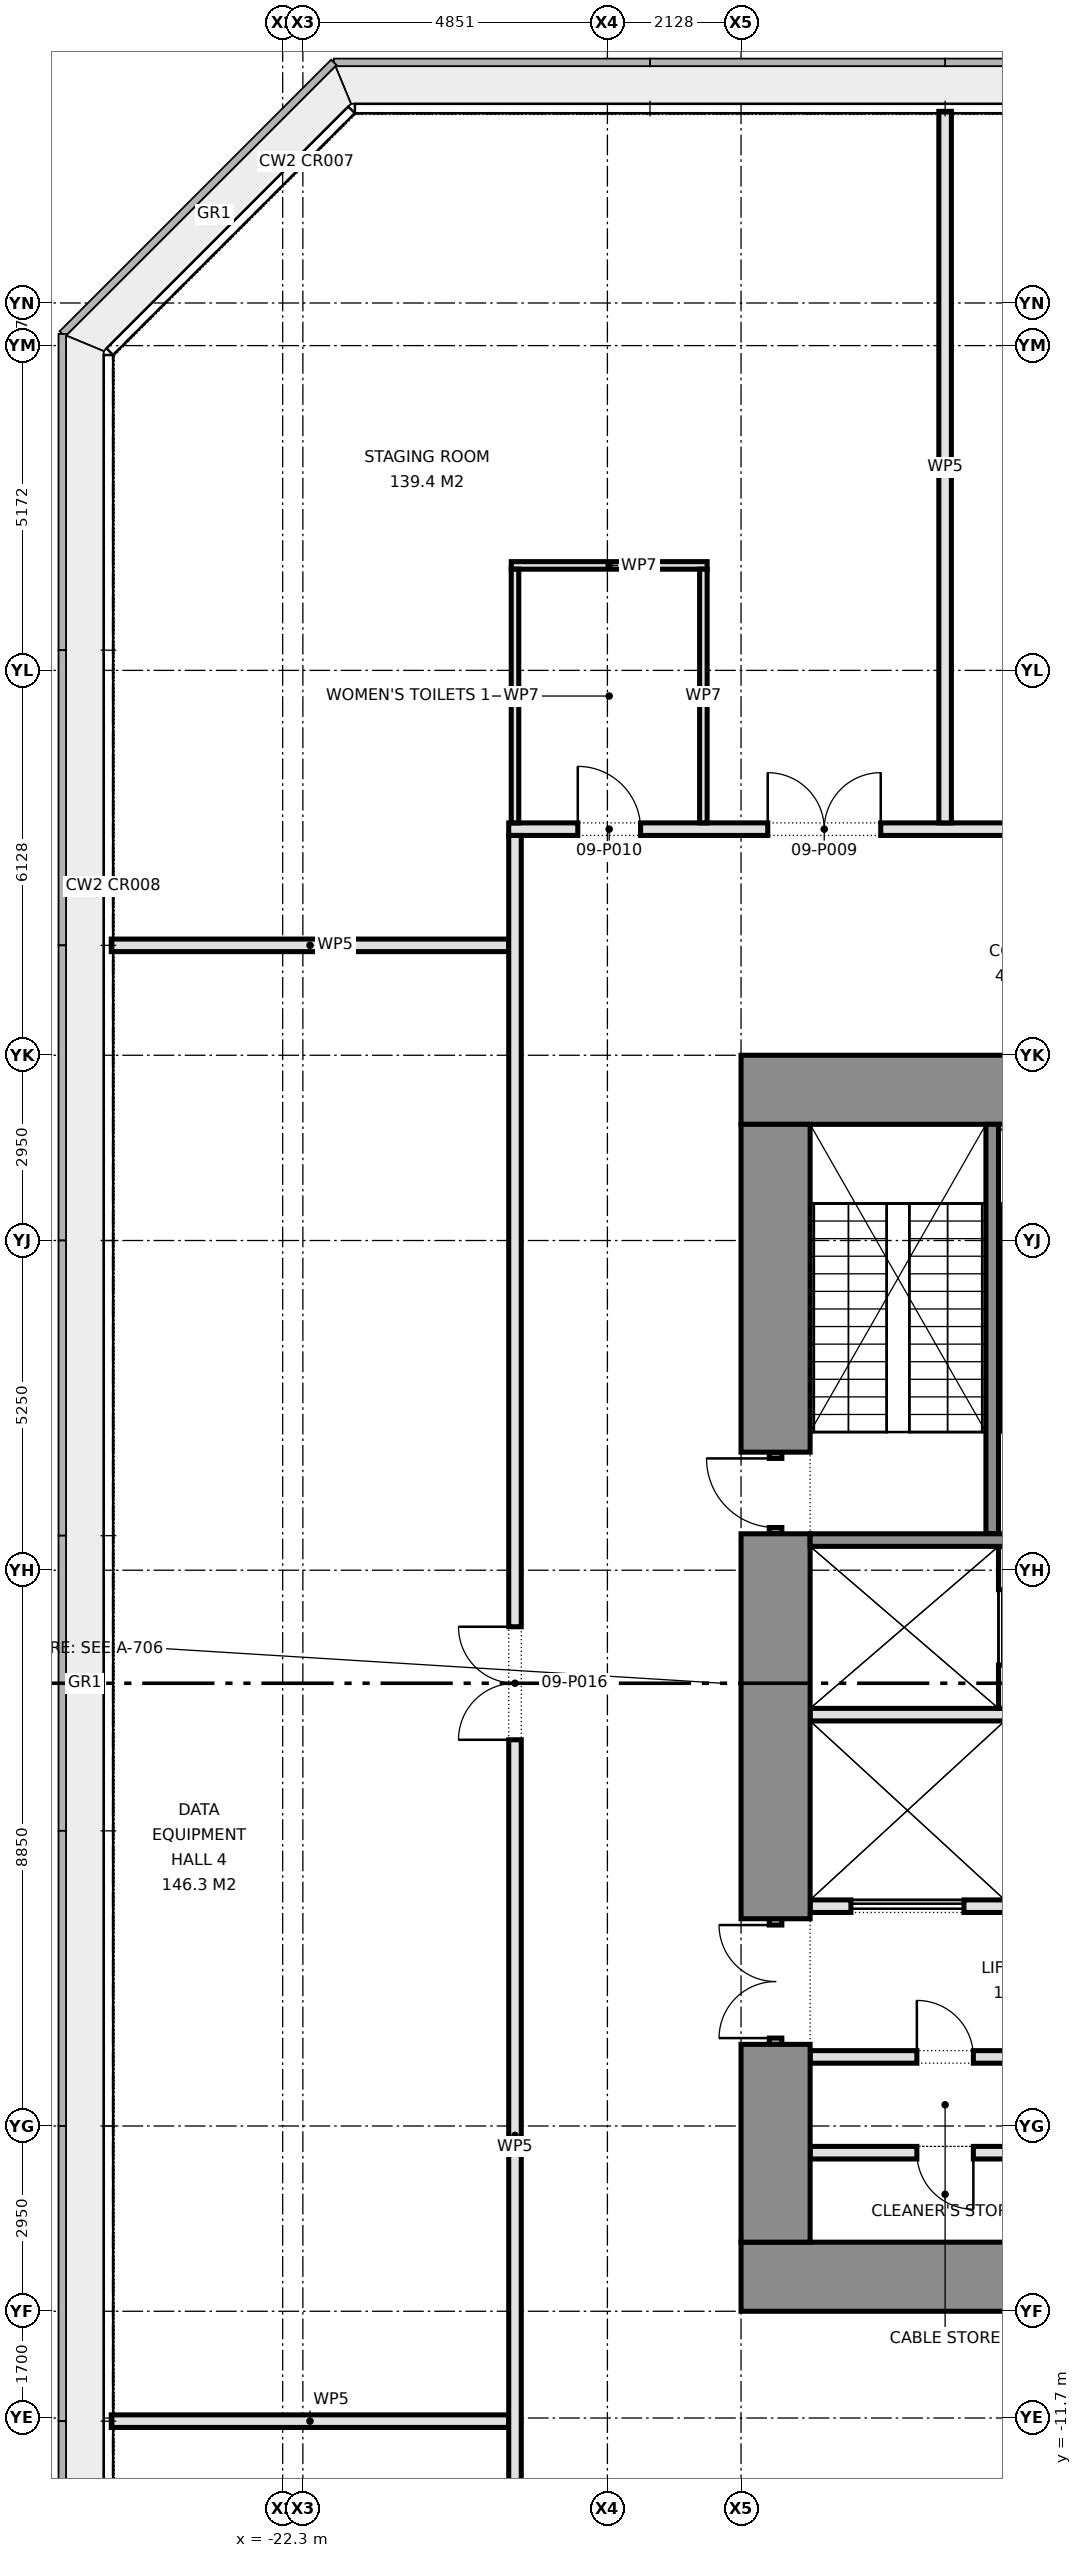
"""IFC4 building model, lengths in metres.
Left out: names, types, materials, properties, quantities, classifications, styles, units other than length and angle.
Written with IfcOpenShell. Run it as: python <this file> out.ifc"""

import sys

from ifc_helpers import new_model, si_unit, direction, frame, frame_2d, origin, place, context, subcontext, project, spatial, rectangle, extrude, element, fill, save


model = new_model("IFC4")
c1 = context("Model", 3, precision=1e-05, world=origin(), true_north=direction((0.0, 1.0)))
c2 = subcontext(c1, "Body", "Model", "MODEL_VIEW")
j1 = project(units=[si_unit("LENGTHUNIT", "METRE"), si_unit("PLANEANGLEUNIT", "RADIAN")], contexts=[c1])
p1 = place(None, origin())
s1 = spatial("IfcSite", under=j1, at=p1, CompositionType="ELEMENT")
p2 = place(p1, origin())
s2 = spatial("IfcBuilding", under=s1, at=p2, CompositionType="ELEMENT")
p3 = place(p2, frame((0.0, 0.0, 40.1)))
s3 = spatial("IfcBuildingStorey", under=s2, at=p3, CompositionType="ELEMENT", Elevation=40.1)
for number, where, z_axis, x_axis in (
    (1, (-15.0, -9.45, 0.0), (0.0, 0.0, 1.0), (1.0, 0.0, 0.0)),
    (2, (-15.0, 9.45, 0.0), (0.0, 0.0, 1.0), (1.0, 0.0, 0.0)),
):
    element("IfcWall", number, at=place(p3, frame(where, z_axis=z_axis, x_axis=x_axis)), inside=s3, PredefinedType="SHEAR", context=c2, shape_type="SweptSolid", body=[
        extrude(rectangle(XDim=11.0, YDim=1.1, at=frame_2d((5.5, 0.0))), origin(), (0.0, 0.0, 1.0), 4.575),
    ])
p4 = place(p3, frame((-14.45, -8.9, 0.0), z_axis=(0.0, 0.0, 1.0), x_axis=(0.0, 1.0, 0.0)))
e3 = element("IfcWall", 3, at=p4, inside=s3, PredefinedType="SHEAR", context=c2, shape_type="SweptSolid", body=[
    extrude(rectangle(XDim=3.15, YDim=1.1, at=frame_2d((1.575, 0.0))), origin(), (0.0, 0.0, 1.0), 4.575),
])
p5 = place(p3, frame((-14.45, -5.75, 0.0), z_axis=(0.0, 0.0, 1.0), x_axis=(0.0, 1.0, 0.0)))
e4 = element("IfcWall", 4, at=p5, inside=s3, PredefinedType="PARTITIONING", context=c2, shape_type="SweptSolid", body=[
    extrude(rectangle(XDim=2.0, YDim=0.2, at=frame_2d((1.0, 0.0))), origin(), (0.0, 0.0, 1.0), 2.4),
])
p6 = place(p5, frame((0.1, 0.0, 0.0)))
e5 = element("IfcOpeningElement", 5, at=p6, cuts=e4, PredefinedType="OPENING", context=c2, shape_type="SweptSolid", body=[
    extrude(rectangle(XDim=1.8, YDim=2.1, at=frame_2d((0.9, 1.05))), frame((0.0, 0.11, 0.0), z_axis=(0.0, -1.0, 0.0), x_axis=(1.0, 0.0, 0.0)), (0.0, 0.0, 1.0), 0.22),
])
p7 = place(p3, frame((-14.45, -3.75, 0.0), z_axis=(0.0, 0.0, 1.0), x_axis=(0.0, 1.0, 0.0)))
e6 = element("IfcWall", 6, at=p7, inside=s3, PredefinedType="SHEAR", context=c2, shape_type="SweptSolid", body=[
    extrude(rectangle(XDim=6.13, YDim=1.1, at=frame_2d((3.065, 0.0))), origin(), (0.0, 0.0, 1.0), 4.575),
])
p8 = place(p3, frame((-14.45, 2.38, 0.0), z_axis=(0.0, 0.0, 1.0), x_axis=(0.0, 1.0, 0.0)))
e7 = element("IfcWall", 7, at=p8, inside=s3, PredefinedType="SHEAR", context=c2, shape_type="SweptSolid", body=[
    extrude(rectangle(XDim=1.3, YDim=0.2, at=frame_2d((0.65, 0.0))), origin(), (0.0, 0.0, 1.0), 2.4),
])
p9 = place(p8, frame((0.1, 0.0, 0.0)))
e8 = element("IfcOpeningElement", 8, at=p9, cuts=e7, PredefinedType="OPENING", context=c2, shape_type="SweptSolid", body=[
    extrude(rectangle(XDim=1.1, YDim=2.1, at=frame_2d((0.55, 1.05))), frame((0.0, 0.11, 0.0), z_axis=(0.0, -1.0, 0.0), x_axis=(1.0, 0.0, 0.0)), (0.0, 0.0, 1.0), 0.22),
])
p10 = place(p3, frame((-14.45, 3.68, 0.0), z_axis=(0.0, 0.0, 1.0), x_axis=(0.0, 1.0, 0.0)))
e9 = element("IfcWall", 9, at=p10, inside=s3, PredefinedType="SHEAR", context=c2, shape_type="SweptSolid", body=[
    extrude(rectangle(XDim=5.22, YDim=1.1, at=frame_2d((2.61, 0.0))), origin(), (0.0, 0.0, 1.0), 4.575),
])
p11 = place(p3, frame((-13.9, -5.95, 0.0), z_axis=(0.0, 0.0, 1.0), x_axis=(1.0, 0.0, 0.0)))
e10 = element("IfcWall", 10, at=p11, inside=s3, PredefinedType="PARTITIONING", context=c2, shape_type="SweptSolid", body=[
    extrude(rectangle(XDim=8.8, YDim=0.2, at=frame_2d((4.4, 0.0))), origin(), (0.0, 0.0, 1.0), 4.575),
])
p12 = place(p11, frame((1.7, 0.0, 0.0)))
e11 = element("IfcOpeningElement", 11, at=p12, cuts=e10, PredefinedType="OPENING", context=c2, shape_type="SweptSolid", body=[
    extrude(rectangle(XDim=0.9, YDim=2.1, at=frame_2d((0.45, 1.05))), frame((0.0, 0.11, 0.0), z_axis=(0.0, -1.0, 0.0), x_axis=(1.0, 0.0, 0.0)), (0.0, 0.0, 1.0), 0.22),
])
p13 = place(p3, frame((-13.9, -3.55, 0.0), z_axis=(0.0, 0.0, 1.0), x_axis=(1.0, 0.0, 0.0)))
e12 = element("IfcWall", 12, at=p13, inside=s3, PredefinedType="PARTITIONING", context=c2, shape_type="SweptSolid", body=[
    extrude(rectangle(XDim=8.8, YDim=0.2, at=frame_2d((4.4, 0.0))), origin(), (0.0, 0.0, 1.0), 4.575),
])
p14 = place(p13, frame((0.65, 0.0, 0.0)))
e13 = element("IfcOpeningElement", 13, at=p14, cuts=e12, PredefinedType="OPENING", context=c2, shape_type="SweptSolid", body=[
    extrude(rectangle(XDim=1.8, YDim=2.1, at=frame_2d((0.9, 1.05))), frame((0.0, 0.11, 0.0), z_axis=(0.0, -1.0, 0.0), x_axis=(1.0, 0.0, 0.0)), (0.0, 0.0, 1.0), 0.22),
])
p15 = place(p13, frame((4.0, 0.0, 0.0)))
e14 = element("IfcOpeningElement", 14, at=p15, cuts=e12, PredefinedType="OPENING", context=c2, shape_type="SweptSolid", body=[
    extrude(rectangle(XDim=1.2, YDim=2.1, at=frame_2d((0.6, 1.05))), frame((0.0, 0.11, 0.0), z_axis=(0.0, -1.0, 0.0), x_axis=(1.0, 0.0, 0.0)), (0.0, 0.0, 1.0), 0.22),
])
p16 = place(p13, frame((6.85, 0.0, 0.0)))
e15 = element("IfcOpeningElement", 15, at=p16, cuts=e12, PredefinedType="OPENING", context=c2, shape_type="SweptSolid", body=[
    extrude(rectangle(XDim=1.2, YDim=2.1, at=frame_2d((0.6, 1.05))), frame((0.0, 0.11, 0.0), z_axis=(0.0, -1.0, 0.0), x_axis=(1.0, 0.0, 0.0)), (0.0, 0.0, 1.0), 0.22),
])
p17 = place(p3, frame((-13.9, -0.5, 0.0), z_axis=(0.0, 0.0, 1.0), x_axis=(1.0, 0.0, 0.0)))
e16 = element("IfcWall", 16, at=p17, inside=s3, PredefinedType="PARTITIONING", context=c2, shape_type="SweptSolid", body=[
    extrude(rectangle(XDim=8.8, YDim=0.2, at=frame_2d((4.4, 0.0))), origin(), (0.0, 0.0, 1.0), 4.575),
])
p18 = place(p3, frame((-10.8, -0.4, 0.0), z_axis=(0.0, 0.0, 1.0), x_axis=(0.0, 1.0, 0.0)))
e17 = element("IfcWall", 17, at=p18, inside=s3, PredefinedType="PARTITIONING", context=c2, shape_type="SweptSolid", body=[
    extrude(rectangle(XDim=2.58, YDim=0.2, at=frame_2d((1.29, 0.0))), origin(), (0.0, 0.0, 1.0), 4.575),
])
p19 = place(p18, frame((0.69, 0.0, 0.0)))
e18 = element("IfcOpeningElement", 18, at=p19, cuts=e17, PredefinedType="OPENING", context=c2, shape_type="SweptSolid", body=[
    extrude(rectangle(XDim=1.2, YDim=2.1, at=frame_2d((0.6, 1.05))), frame((0.0, 0.11, 0.0), z_axis=(0.0, -1.0, 0.0), x_axis=(1.0, 0.0, 0.0)), (0.0, 0.0, 1.0), 0.22),
])
p20 = place(p3, frame((-13.9, 2.28, 0.0), z_axis=(0.0, 0.0, 1.0), x_axis=(1.0, 0.0, 0.0)))
e19 = element("IfcWall", 19, at=p20, inside=s3, PredefinedType="SHEAR", context=c2, shape_type="SweptSolid", body=[
    extrude(rectangle(XDim=8.8, YDim=0.2, at=frame_2d((4.4, 0.0))), origin(), (0.0, 0.0, 1.0), 4.575),
])
p21 = place(p20, frame((3.8, 0.0, 0.0)))
e20 = element("IfcOpeningElement", 20, at=p21, cuts=e19, PredefinedType="OPENING", context=c2, shape_type="SweptSolid", body=[
    extrude(rectangle(XDim=1.2, YDim=2.1, at=frame_2d((0.6, 1.05))), frame((0.0, 0.11, 0.0), z_axis=(0.0, -1.0, 0.0), x_axis=(1.0, 0.0, 0.0)), (0.0, 0.0, 1.0), 0.22),
])
p22 = place(p20, frame((6.8, 0.0, 0.0)))
e21 = element("IfcOpeningElement", 21, at=p22, cuts=e19, PredefinedType="OPENING", context=c2, shape_type="SweptSolid", body=[
    extrude(rectangle(XDim=1.2, YDim=2.1, at=frame_2d((0.6, 1.05))), frame((0.0, 0.11, 0.0), z_axis=(0.0, -1.0, 0.0), x_axis=(1.0, 0.0, 0.0)), (0.0, 0.0, 1.0), 0.22),
])
p23 = place(p3, frame((-11.0, 2.38, 0.0), z_axis=(0.0, 0.0, 1.0), x_axis=(0.0, 1.0, 0.0)))
e22 = element("IfcWall", 22, at=p23, inside=s3, PredefinedType="SHEAR", context=c2, shape_type="SweptSolid", body=[
    extrude(rectangle(XDim=6.52, YDim=0.2, at=frame_2d((3.26, 0.0))), origin(), (0.0, 0.0, 1.0), 4.575),
])
p24 = place(p3, frame((-13.9, -7.475, 0.0), z_axis=(0.0, 0.0, 1.0), x_axis=(1.0, 0.0, 0.0)))
e23 = element("IfcWall", 23, at=p24, inside=s3, PredefinedType="PARTITIONING", context=c2, shape_type="SweptSolid", body=[
    extrude(rectangle(XDim=4.3, YDim=0.2, at=frame_2d((2.15, 0.0))), origin(), (0.0, 0.0, 1.0), 4.575),
])
p25 = place(p24, frame((1.7, 0.0, 0.0)))
e24 = element("IfcOpeningElement", 24, at=p25, cuts=e23, PredefinedType="OPENING", context=c2, shape_type="SweptSolid", body=[
    extrude(rectangle(XDim=0.9, YDim=2.1, at=frame_2d((0.45, 1.05))), frame((0.0, 0.11, 0.0), z_axis=(0.0, -1.0, 0.0), x_axis=(1.0, 0.0, 0.0)), (0.0, 0.0, 1.0), 0.22),
])
for number, where, z_axis, x_axis in (
    (25, (-25.03, -11.75, 0.0), (0.0, 0.0, 1.0), (1.0, 0.0, 0.0)),
    (26, (-25.03, 11.75, 0.0), (0.0, 0.0, 1.0), (1.0, 0.0, 0.0)),
):
    element("IfcWall", number, at=place(p3, frame(where, z_axis=z_axis, x_axis=x_axis)), inside=s3, PredefinedType="PARTITIONING", context=c2, shape_type="SweptSolid", body=[
        extrude(rectangle(XDim=6.33, YDim=0.2, at=frame_2d((3.165, 0.0))), origin(), (0.0, 0.0, 1.0), 4.575),
    ])
p26 = place(p3, frame((-18.7, 13.6, 0.0), z_axis=(0.0, 0.0, 1.0), x_axis=(1.0, 0.0, 0.0)))
e27 = element("IfcWall", 27, at=p26, inside=s3, PredefinedType="PARTITIONING", context=c2, shape_type="SweptSolid", body=[
    extrude(rectangle(XDim=37.4, YDim=0.2, at=frame_2d((18.7, 0.0))), origin(), (0.0, 0.0, 1.0), 4.575),
])
p27 = place(p26, frame((4.125, 0.0, 0.0)))
e28 = element("IfcOpeningElement", 28, at=p27, cuts=e27, PredefinedType="OPENING", context=c2, shape_type="SweptSolid", body=[
    extrude(rectangle(XDim=1.8, YDim=2.1, at=frame_2d((0.9, 1.05))), frame((0.0, 0.11, 0.0), z_axis=(0.0, -1.0, 0.0), x_axis=(1.0, 0.0, 0.0)), (0.0, 0.0, 1.0), 0.22),
])
p28 = place(p26, frame((1.1, 0.0, 0.0)))
e29 = element("IfcOpeningElement", 29, at=p28, cuts=e27, PredefinedType="OPENING", context=c2, shape_type="SweptSolid", body=[
    extrude(rectangle(XDim=1.0, YDim=2.1, at=frame_2d((0.5, 1.05))), frame((0.0, 0.11, 0.0), z_axis=(0.0, -1.0, 0.0), x_axis=(1.0, 0.0, 0.0)), (0.0, 0.0, 1.0), 0.22),
])
p29 = place(p26, frame((10.75, 0.0, 0.0)))
e30 = element("IfcOpeningElement", 30, at=p29, cuts=e27, PredefinedType="OPENING", context=c2, shape_type="SweptSolid", body=[
    extrude(rectangle(XDim=1.8, YDim=2.1, at=frame_2d((0.9, 1.05))), frame((0.0, 0.11, 0.0), z_axis=(0.0, -1.0, 0.0), x_axis=(1.0, 0.0, 0.0)), (0.0, 0.0, 1.0), 0.22),
])
p30 = place(p26, frame((20.15, 0.0, 0.0)))
e31 = element("IfcOpeningElement", 31, at=p30, cuts=e27, PredefinedType="OPENING", context=c2, shape_type="SweptSolid", body=[
    extrude(rectangle(XDim=1.8, YDim=2.1, at=frame_2d((0.9, 1.05))), frame((0.0, 0.11, 0.0), z_axis=(0.0, -1.0, 0.0), x_axis=(1.0, 0.0, 0.0)), (0.0, 0.0, 1.0), 0.22),
])
p31 = place(p26, frame((30.625, 0.0, 0.0)))
e32 = element("IfcOpeningElement", 32, at=p31, cuts=e27, PredefinedType="OPENING", context=c2, shape_type="SweptSolid", body=[
    extrude(rectangle(XDim=1.8, YDim=2.1, at=frame_2d((0.9, 1.05))), frame((0.0, 0.11, 0.0), z_axis=(0.0, -1.0, 0.0), x_axis=(1.0, 0.0, 0.0)), (0.0, 0.0, 1.0), 0.22),
])
p32 = place(p3, frame((-11.75, 13.7, 0.0), z_axis=(0.0, 0.0, 1.0), x_axis=(0.0, 1.0, 0.0)))
e33 = element("IfcWall", 33, at=p32, inside=s3, PredefinedType="PARTITIONING", context=c2, shape_type="SweptSolid", body=[
    extrude(rectangle(XDim=11.33, YDim=0.2, at=frame_2d((5.665, 0.0))), origin(), (0.0, 0.0, 1.0), 4.575),
])
p33 = place(p3, frame((-18.6, -13.5, 0.0), z_axis=(0.0, 0.0, 1.0), x_axis=(0.0, 1.0, 0.0)))
e34 = element("IfcWall", 34, at=p33, inside=s3, PredefinedType="PARTITIONING", context=c2, shape_type="SweptSolid", body=[
    extrude(rectangle(XDim=27.0, YDim=0.2, at=frame_2d((13.5, 0.0))), origin(), (0.0, 0.0, 1.0), 4.575),
])
p34 = place(p33, frame((12.6, 0.0, 0.0)))
e35 = element("IfcOpeningElement", 35, at=p34, cuts=e34, PredefinedType="OPENING", context=c2, shape_type="SweptSolid", body=[
    extrude(rectangle(XDim=1.8, YDim=2.1, at=frame_2d((0.9, 1.05))), frame((0.0, 0.11, 0.0), z_axis=(0.0, -1.0, 0.0), x_axis=(1.0, 0.0, 0.0)), (0.0, 0.0, 1.0), 0.22),
])
p35 = place(p3, frame((-18.66, 17.8, 0.0), z_axis=(0.0, 0.0, 1.0), x_axis=(1.0, 0.0, 0.0)))
e36 = element("IfcWall", 36, at=p35, inside=s3, PredefinedType="PARTITIONING", context=c2, shape_type="SweptSolid", body=[
    extrude(rectangle(XDim=3.12, YDim=0.12, at=frame_2d((1.56, 0.0))), origin(), (0.0, 0.0, 1.0), 4.575),
])
for number, where, z_axis, x_axis in (
    (37, (-15.6, 13.7, 0.0), (0.0, 0.0, 1.0), (0.0, 1.0, 0.0)),
    (38, (-18.6, 13.7, 0.0), (0.0, 0.0, 1.0), (0.0, 1.0, 0.0)),
):
    element("IfcWall", number, at=place(p3, frame(where, z_axis=z_axis, x_axis=x_axis)), inside=s3, PredefinedType="PARTITIONING", context=c2, shape_type="SweptSolid", body=[
        extrude(rectangle(XDim=4.04, YDim=0.12, at=frame_2d((2.02, 0.0))), origin(), (0.0, 0.0, 1.0), 4.575),
    ])
p36 = place(p6, origin())
e39 = element("IfcDoor", 39, at=p36, inside=s3, OperationType="DOUBLE_DOOR_SINGLE_SWING", PredefinedType="DOOR", context=c2, shape_type="SweptSolid", body=[
    extrude(rectangle(XDim=1.8, YDim=2.1, at=frame_2d((0.9, 1.05))), frame((0.0, 0.025, 0.0), z_axis=(0.0, -1.0, 0.0), x_axis=(1.0, 0.0, 0.0)), (0.0, 0.0, 1.0), 0.05),
])
fill(e5, e39)
p37 = place(p9, origin())
e40 = element("IfcDoor", 40, at=p37, inside=s3, OperationType="SINGLE_SWING_RIGHT", PredefinedType="DOOR", context=c2, shape_type="SweptSolid", body=[
    extrude(rectangle(XDim=1.1, YDim=2.1, at=frame_2d((0.55, 1.05))), frame((0.0, 0.025, 0.0), z_axis=(0.0, -1.0, 0.0), x_axis=(1.0, 0.0, 0.0)), (0.0, 0.0, 1.0), 0.05),
])
fill(e8, e40)
p38 = place(p14, origin())
e41 = element("IfcDoor", 41, at=p38, inside=s3, OperationType="DOUBLE_DOOR_SLIDING", PredefinedType="DOOR", context=c2, shape_type="SweptSolid", body=[
    extrude(rectangle(XDim=1.8, YDim=2.1, at=frame_2d((0.9, 1.05))), frame((0.0, 0.025, 0.0), z_axis=(0.0, -1.0, 0.0), x_axis=(1.0, 0.0, 0.0)), (0.0, 0.0, 1.0), 0.05),
])
fill(e13, e41)
p39 = place(p12, origin())
e42 = element("IfcDoor", 42, at=p39, inside=s3, OperationType="SINGLE_SWING_LEFT", PredefinedType="DOOR", context=c2, shape_type="SweptSolid", body=[
    extrude(rectangle(XDim=0.9, YDim=2.1, at=frame_2d((0.45, 1.05))), frame((0.0, 0.025, 0.0), z_axis=(0.0, -1.0, 0.0), x_axis=(1.0, 0.0, 0.0)), (0.0, 0.0, 1.0), 0.05),
])
fill(e11, e42)
p40 = place(p25, frame((0.9, 0.0, 0.0), z_axis=(0.0, 0.0, 1.0), x_axis=(-1.0, 0.0, 0.0)))
e43 = element("IfcDoor", 43, at=p40, inside=s3, OperationType="SINGLE_SWING_LEFT", PredefinedType="DOOR", context=c2, shape_type="SweptSolid", body=[
    extrude(rectangle(XDim=0.9, YDim=2.1, at=frame_2d((0.45, 1.05))), frame((0.0, 0.025, 0.0), z_axis=(0.0, -1.0, 0.0), x_axis=(1.0, 0.0, 0.0)), (0.0, 0.0, 1.0), 0.05),
])
fill(e24, e43)
p41 = place(p27, origin())
e44 = element("IfcDoor", 44, at=p41, inside=s3, OperationType="DOUBLE_DOOR_SINGLE_SWING", PredefinedType="DOOR", context=c2, shape_type="SweptSolid", body=[
    extrude(rectangle(XDim=1.8, YDim=2.1, at=frame_2d((0.9, 1.05))), frame((0.0, 0.025, 0.0), z_axis=(0.0, -1.0, 0.0), x_axis=(1.0, 0.0, 0.0)), (0.0, 0.0, 1.0), 0.05),
])
fill(e28, e44)
p42 = place(p28, origin())
e45 = element("IfcDoor", 45, at=p42, inside=s3, OperationType="SINGLE_SWING_LEFT", PredefinedType="DOOR", context=c2, shape_type="SweptSolid", body=[
    extrude(rectangle(XDim=1.0, YDim=2.1, at=frame_2d((0.5, 1.05))), frame((0.0, 0.025, 0.0), z_axis=(0.0, -1.0, 0.0), x_axis=(1.0, 0.0, 0.0)), (0.0, 0.0, 1.0), 0.05),
])
fill(e29, e45)
p43 = place(p34, origin())
e46 = element("IfcDoor", 46, at=p43, inside=s3, OperationType="DOUBLE_DOOR_SINGLE_SWING", PredefinedType="DOOR", context=c2, shape_type="SweptSolid", body=[
    extrude(rectangle(XDim=1.8, YDim=2.1, at=frame_2d((0.9, 1.05))), frame((0.0, 0.025, 0.0), z_axis=(0.0, -1.0, 0.0), x_axis=(1.0, 0.0, 0.0)), (0.0, 0.0, 1.0), 0.05),
])
fill(e35, e46)
save(model, sys.argv[1])
